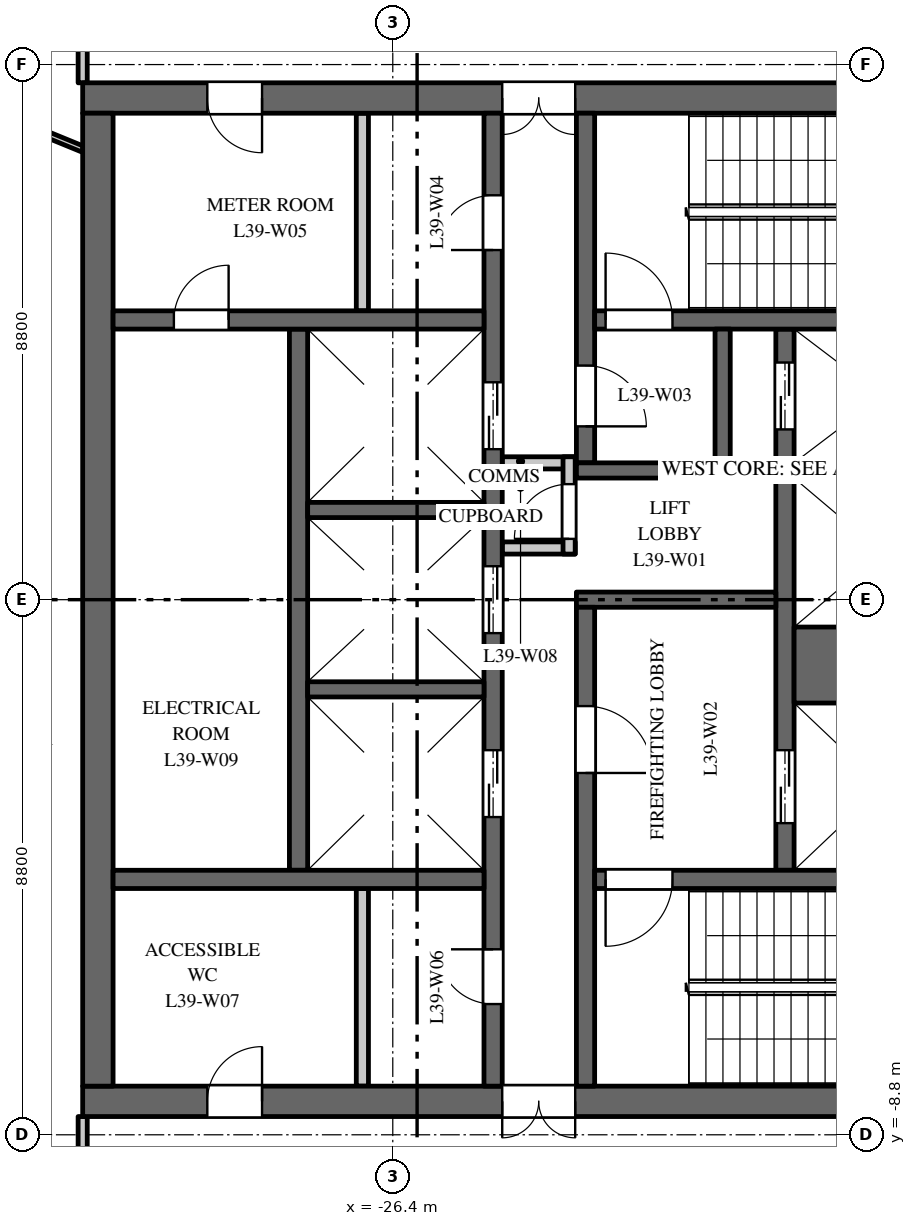
"""IFC4 building model, lengths in metres.
Left out: names, types, materials, properties, quantities, classifications, styles, units other than length and angle.
Written with IfcOpenShell. Run it as: python <this file> out.ifc"""

import sys

from ifc_helpers import new_model, si_unit, direction, frame, frame_2d, origin, place, context, subcontext, project, spatial, rectangle, extrude, element, fill, save


model = new_model("IFC4")
c1 = context("Model", 3, precision=1e-05, world=origin(), true_north=direction((0.0, 1.0)))
c2 = subcontext(c1, "Body", "Model", "MODEL_VIEW")
j1 = project(units=[si_unit("LENGTHUNIT", "METRE"), si_unit("PLANEANGLEUNIT", "RADIAN")], contexts=[c1])
p1 = place(None, origin())
s1 = spatial("IfcSite", under=j1, at=p1, CompositionType="ELEMENT")
p2 = place(p1, origin())
s2 = spatial("IfcBuilding", under=s1, at=p2, CompositionType="ELEMENT")
p3 = place(p2, frame((0.0, 0.0, 170.0)))
s3 = spatial("IfcBuildingStorey", under=s2, at=p3, CompositionType="ELEMENT", Elevation=170.0)
p4 = place(p3, frame((-16.5, 8.25, 0.0), z_axis=(0.0, 0.0, 1.0), x_axis=(-1.0, 0.0, 0.0)))
e1 = element("IfcWall", 1, at=p4, inside=s3, PredefinedType="SHEAR", context=c2, shape_type="SweptSolid", body=[
    extrude(rectangle(XDim=15.0, YDim=0.5, at=frame_2d((7.5, 0.0))), origin(), (0.0, 0.0, 1.0), 3.7),
])
p5 = place(p4, frame((6.9, 0.0, 0.0)))
e2 = element("IfcOpeningElement", 2, at=p5, cuts=e1, PredefinedType="OPENING", context=c2, shape_type="SweptSolid", body=[
    extrude(rectangle(XDim=1.2, YDim=2.1, at=frame_2d((0.6, 1.05))), frame((0.0, 0.26, 0.0), z_axis=(0.0, -1.0, 0.0), x_axis=(1.0, 0.0, 0.0)), (0.0, 0.0, 1.0), 0.52),
])
p6 = place(p4, frame((12.05, 0.0, 0.0)))
e3 = element("IfcOpeningElement", 3, at=p6, cuts=e1, PredefinedType="OPENING", context=c2, shape_type="SweptSolid", body=[
    extrude(rectangle(XDim=0.9, YDim=2.1, at=frame_2d((0.45, 1.05))), frame((0.0, 0.26, 0.0), z_axis=(0.0, -1.0, 0.0), x_axis=(1.0, 0.0, 0.0)), (0.0, 0.0, 1.0), 0.52),
])
p7 = place(p3, frame((-16.5, -8.25, 0.0), z_axis=(0.0, 0.0, 1.0), x_axis=(-1.0, 0.0, 0.0)))
e4 = element("IfcWall", 4, at=p7, inside=s3, PredefinedType="SHEAR", context=c2, shape_type="SweptSolid", body=[
    extrude(rectangle(XDim=15.0, YDim=0.5, at=frame_2d((7.5, 0.0))), origin(), (0.0, 0.0, 1.0), 3.7),
])
p8 = place(p7, frame((6.9, 0.0, 0.0)))
e5 = element("IfcOpeningElement", 5, at=p8, cuts=e4, PredefinedType="OPENING", context=c2, shape_type="SweptSolid", body=[
    extrude(rectangle(XDim=1.2, YDim=2.1, at=frame_2d((0.6, 1.05))), frame((0.0, 0.26, 0.0), z_axis=(0.0, -1.0, 0.0), x_axis=(1.0, 0.0, 0.0)), (0.0, 0.0, 1.0), 0.52),
])
p9 = place(p7, frame((12.05, 0.0, 0.0)))
e6 = element("IfcOpeningElement", 6, at=p9, cuts=e4, PredefinedType="OPENING", context=c2, shape_type="SweptSolid", body=[
    extrude(rectangle(XDim=0.9, YDim=2.1, at=frame_2d((0.45, 1.05))), frame((0.0, 0.26, 0.0), z_axis=(0.0, -1.0, 0.0), x_axis=(1.0, 0.0, 0.0)), (0.0, 0.0, 1.0), 0.52),
])
p10 = place(p3, frame((-27.95, -4.45, 0.0), z_axis=(0.0, 0.0, 1.0), x_axis=(0.0, 1.0, 0.0)))
e7 = element("IfcWall", 7, at=p10, inside=s3, PredefinedType="SHEAR", context=c2, shape_type="SweptSolid", body=[
    extrude(rectangle(XDim=8.9, YDim=0.3, at=frame_2d((4.45, 0.0))), origin(), (0.0, 0.0, 1.0), 3.7),
])
p11 = place(p3, frame((-19.95, -4.45, 0.0), z_axis=(0.0, 0.0, 1.0), x_axis=(0.0, 1.0, 0.0)))
e8 = element("IfcWall", 8, at=p11, inside=s3, PredefinedType="SHEAR", context=c2, shape_type="SweptSolid", body=[
    extrude(rectangle(XDim=8.9, YDim=0.3, at=frame_2d((4.45, 0.0))), origin(), (0.0, 0.0, 1.0), 3.7),
])
p12 = place(p11, frame((0.775, 0.0, 0.0)))
e9 = element("IfcOpeningElement", 9, at=p12, cuts=e8, PredefinedType="OPENING", context=c2, shape_type="SweptSolid", body=[
    extrude(rectangle(XDim=1.2, YDim=2.1, at=frame_2d((0.6, 1.05))), frame((0.0, 0.16, 0.0), z_axis=(0.0, -1.0, 0.0), x_axis=(1.0, 0.0, 0.0)), (0.0, 0.0, 1.0), 0.32),
])
p13 = place(p11, frame((7.25, 0.0, 0.0)))
e10 = element("IfcOpeningElement", 10, at=p13, cuts=e8, PredefinedType="OPENING", context=c2, shape_type="SweptSolid", body=[
    extrude(rectangle(XDim=1.1, YDim=2.1, at=frame_2d((0.55, 1.05))), frame((0.0, 0.16, 0.0), z_axis=(0.0, -1.0, 0.0), x_axis=(1.0, 0.0, 0.0)), (0.0, 0.0, 1.0), 0.32),
])
p14 = place(p3, frame((-24.75, -8.0, 0.0), z_axis=(0.0, 0.0, 1.0), x_axis=(0.0, 1.0, 0.0)))
e11 = element("IfcWall", 11, at=p14, inside=s3, PredefinedType="SHEAR", context=c2, shape_type="SweptSolid", body=[
    extrude(rectangle(XDim=16.0, YDim=0.3, at=frame_2d((8.0, 0.0))), origin(), (0.0, 0.0, 1.0), 3.7),
])
p15 = place(p14, frame((4.425, 0.0, 0.0)))
e12 = element("IfcOpeningElement", 12, at=p15, cuts=e11, PredefinedType="OPENING", context=c2, shape_type="SweptSolid", body=[
    extrude(rectangle(XDim=1.1, YDim=2.1, at=frame_2d((0.55, 1.05))), frame((0.0, 0.16, 0.0), z_axis=(0.0, -1.0, 0.0), x_axis=(1.0, 0.0, 0.0)), (0.0, 0.0, 1.0), 0.32),
])
p16 = place(p14, frame((7.45, 0.0, 0.0)))
e13 = element("IfcOpeningElement", 13, at=p16, cuts=e11, PredefinedType="OPENING", context=c2, shape_type="SweptSolid", body=[
    extrude(rectangle(XDim=1.1, YDim=2.1, at=frame_2d((0.55, 1.05))), frame((0.0, 0.16, 0.0), z_axis=(0.0, -1.0, 0.0), x_axis=(1.0, 0.0, 0.0)), (0.0, 0.0, 1.0), 0.32),
])
p17 = place(p14, frame((10.475, 0.0, 0.0)))
e14 = element("IfcOpeningElement", 14, at=p17, cuts=e11, PredefinedType="OPENING", context=c2, shape_type="SweptSolid", body=[
    extrude(rectangle(XDim=1.1, YDim=2.1, at=frame_2d((0.55, 1.05))), frame((0.0, 0.16, 0.0), z_axis=(0.0, -1.0, 0.0), x_axis=(1.0, 0.0, 0.0)), (0.0, 0.0, 1.0), 0.32),
])
p18 = place(p14, frame((13.75, 0.0, 0.0)))
e15 = element("IfcOpeningElement", 15, at=p18, cuts=e11, PredefinedType="OPENING", context=c2, shape_type="SweptSolid", body=[
    extrude(rectangle(XDim=0.9, YDim=2.1, at=frame_2d((0.45, 1.05))), frame((0.0, 0.16, 0.0), z_axis=(0.0, -1.0, 0.0), x_axis=(1.0, 0.0, 0.0)), (0.0, 0.0, 1.0), 0.32),
])
p19 = place(p14, frame((1.35, 0.0, 0.0)))
e16 = element("IfcOpeningElement", 16, at=p19, cuts=e11, PredefinedType="OPENING", context=c2, shape_type="SweptSolid", body=[
    extrude(rectangle(XDim=0.9, YDim=2.1, at=frame_2d((0.45, 1.05))), frame((0.0, 0.16, 0.0), z_axis=(0.0, -1.0, 0.0), x_axis=(1.0, 0.0, 0.0)), (0.0, 0.0, 1.0), 0.32),
])
p20 = place(p3, frame((-20.1, 0.0, 0.0), z_axis=(0.0, 0.0, 1.0), x_axis=(-1.0, 0.0, 0.0)))
e17 = element("IfcWall", 17, at=p20, inside=s3, PredefinedType="SHEAR", context=c2, shape_type="SweptSolid", body=[
    extrude(rectangle(XDim=3.28, YDim=0.25, at=frame_2d((1.64, 0.0))), origin(), (0.0, 0.0, 1.0), 3.7),
])
for number, where, z_axis, x_axis in (
    (18, (-23.4, 0.85, 0.0), (0.0, 0.0, 1.0), (-1.0, 0.0, 0.0)),
    (19, (-23.4, 2.25, 0.0), (0.0, 0.0, 1.0), (-1.0, 0.0, 0.0)),
):
    element("IfcWall", number, at=place(p3, frame(where, z_axis=z_axis, x_axis=x_axis)), inside=s3, PredefinedType="PARTITIONING", context=c2, shape_type="SweptSolid", body=[
        extrude(rectangle(XDim=1.2, YDim=0.2, at=frame_2d((0.6, 0.0))), origin(), (0.0, 0.0, 1.0), 3.7),
    ])
p21 = place(p3, frame((-23.5, 0.75, 0.0), z_axis=(0.0, 0.0, 1.0), x_axis=(0.0, 1.0, 0.0)))
e20 = element("IfcWall", 20, at=p21, inside=s3, PredefinedType="PARTITIONING", context=c2, shape_type="SweptSolid", body=[
    extrude(rectangle(XDim=1.6, YDim=0.2, at=frame_2d((0.8, 0.0))), origin(), (0.0, 0.0, 1.0), 3.7),
])
p22 = place(p21, frame((0.25, 0.0, 0.0)))
e21 = element("IfcOpeningElement", 21, at=p22, cuts=e20, PredefinedType="OPENING", context=c2, shape_type="SweptSolid", body=[
    extrude(rectangle(XDim=0.9, YDim=2.1, at=frame_2d((0.45, 1.05))), frame((0.0, 0.11, 0.0), z_axis=(0.0, -1.0, 0.0), x_axis=(1.0, 0.0, 0.0)), (0.0, 0.0, 1.0), 0.22),
])
p23 = place(p3, frame((-31.25, -8.0, 0.0), z_axis=(0.0, 0.0, 1.0), x_axis=(0.0, 1.0, 0.0)))
e22 = element("IfcWall", 22, at=p23, inside=s3, PredefinedType="SHEAR", context=c2, shape_type="SweptSolid", body=[
    extrude(rectangle(XDim=16.0, YDim=0.5, at=frame_2d((8.0, 0.0))), origin(), (0.0, 0.0, 1.0), 3.7),
])
p24 = place(p3, frame((-24.9, 4.6, 0.0), z_axis=(0.0, 0.0, 1.0), x_axis=(-1.0, 0.0, 0.0)))
e23 = element("IfcWall", 23, at=p24, inside=s3, PredefinedType="SHEAR", context=c2, shape_type="SweptSolid", body=[
    extrude(rectangle(XDim=6.1, YDim=0.3, at=frame_2d((3.05, 0.0))), origin(), (0.0, 0.0, 1.0), 3.7),
])
p25 = place(p24, frame((4.2, 0.0, 0.0)))
e24 = element("IfcOpeningElement", 24, at=p25, cuts=e23, PredefinedType="OPENING", context=c2, shape_type="SweptSolid", body=[
    extrude(rectangle(XDim=0.9, YDim=2.1, at=frame_2d((0.45, 1.05))), frame((0.0, 0.16, 0.0), z_axis=(0.0, -1.0, 0.0), x_axis=(1.0, 0.0, 0.0)), (0.0, 0.0, 1.0), 0.32),
])
for number, where, z_axis, x_axis in (
    (25, (-26.9, 4.75, 0.0), (0.0, 0.0, 1.0), (0.0, 1.0, 0.0)),
    (26, (-26.9, -8.0, 0.0), (0.0, 0.0, 1.0), (0.0, 1.0, 0.0)),
):
    element("IfcWall", number, at=place(p3, frame(where, z_axis=z_axis, x_axis=x_axis)), inside=s3, PredefinedType="PARTITIONING", context=c2, shape_type="SweptSolid", body=[
        extrude(rectangle(XDim=3.25, YDim=0.2, at=frame_2d((1.625, 0.0))), origin(), (0.0, 0.0, 1.0), 3.7),
    ])
p26 = place(p3, frame((-24.9, -4.6, 0.0), z_axis=(0.0, 0.0, 1.0), x_axis=(-1.0, 0.0, 0.0)))
e27 = element("IfcWall", 27, at=p26, inside=s3, PredefinedType="SHEAR", context=c2, shape_type="SweptSolid", body=[
    extrude(rectangle(XDim=6.1, YDim=0.3, at=frame_2d((3.05, 0.0))), origin(), (0.0, 0.0, 1.0), 3.7),
])
p27 = place(p3, frame((-16.9, -1.075, 0.0), z_axis=(0.0, 0.0, 1.0), x_axis=(-1.0, 0.0, 0.0)))
e28 = element("IfcWall", 28, at=p27, inside=s3, PredefinedType="SHEAR", context=c2, shape_type="SweptSolid", body=[
    extrude(rectangle(XDim=2.9, YDim=1.25, at=frame_2d((1.45, 0.0))), origin(), (0.0, 0.0, 1.0), 3.7),
])
for number, where, z_axis, x_axis in (
    (29, (-16.9, 2.125, 0.0), (0.0, 0.0, 1.0), (-1.0, 0.0, 0.0)),
    (30, (-24.9, -1.475, 0.0), (0.0, 0.0, 1.0), (-1.0, 0.0, 0.0)),
    (31, (-24.9, 1.475, 0.0), (0.0, 0.0, 1.0), (-1.0, 0.0, 0.0)),
):
    element("IfcWall", number, at=place(p3, frame(where, z_axis=z_axis, x_axis=x_axis)), inside=s3, PredefinedType="SHEAR", context=c2, shape_type="SweptSolid", body=[
        extrude(rectangle(XDim=2.9, YDim=0.25, at=frame_2d((1.45, 0.0))), origin(), (0.0, 0.0, 1.0), 3.7),
    ])
p28 = place(p3, frame((-23.23, 2.25, 0.0), z_axis=(0.0, 0.0, 1.0), x_axis=(0.0, 1.0, 0.0)))
e32 = element("IfcWall", 32, at=p28, inside=s3, PredefinedType="SHEAR", context=c2, shape_type="SweptSolid", body=[
    extrude(rectangle(XDim=5.75, YDim=0.3, at=frame_2d((2.875, 0.0))), origin(), (0.0, 0.0, 1.0), 3.7),
])
p29 = place(p28, frame((0.6, 0.0, 0.0)))
e33 = element("IfcOpeningElement", 33, at=p29, cuts=e32, PredefinedType="OPENING", context=c2, shape_type="SweptSolid", body=[
    extrude(rectangle(XDim=1.0, YDim=2.1, at=frame_2d((0.5, 1.05))), frame((0.0, 0.16, 0.0), z_axis=(0.0, -1.0, 0.0), x_axis=(1.0, 0.0, 0.0)), (0.0, 0.0, 1.0), 0.32),
])
p30 = place(p3, frame((-23.23, -8.0, 0.0), z_axis=(0.0, 0.0, 1.0), x_axis=(0.0, 1.0, 0.0)))
e34 = element("IfcWall", 34, at=p30, inside=s3, PredefinedType="SHEAR", context=c2, shape_type="SweptSolid", body=[
    extrude(rectangle(XDim=7.875, YDim=0.3, at=frame_2d((3.938, 0.0))), origin(), (0.0, 0.0, 1.0), 3.7),
])
p31 = place(p30, frame((5.15, 0.0, 0.0)))
e35 = element("IfcOpeningElement", 35, at=p31, cuts=e34, PredefinedType="OPENING", context=c2, shape_type="SweptSolid", body=[
    extrude(rectangle(XDim=1.1, YDim=2.1, at=frame_2d((0.55, 1.05))), frame((0.0, 0.16, 0.0), z_axis=(0.0, -1.0, 0.0), x_axis=(1.0, 0.0, 0.0)), (0.0, 0.0, 1.0), 0.32),
])
p32 = place(p3, frame((-16.9, 4.6, 0.0), z_axis=(0.0, 0.0, 1.0), x_axis=(-1.0, 0.0, 0.0)))
e36 = element("IfcWall", 36, at=p32, inside=s3, PredefinedType="SHEAR", context=c2, shape_type="SweptSolid", body=[
    extrude(rectangle(XDim=6.18, YDim=0.3, at=frame_2d((3.09, 0.0))), origin(), (0.0, 0.0, 1.0), 3.7),
])
p33 = place(p32, frame((4.9, 0.0, 0.0)))
e37 = element("IfcOpeningElement", 37, at=p33, cuts=e36, PredefinedType="OPENING", context=c2, shape_type="SweptSolid", body=[
    extrude(rectangle(XDim=1.1, YDim=2.1, at=frame_2d((0.55, 1.05))), frame((0.0, 0.16, 0.0), z_axis=(0.0, -1.0, 0.0), x_axis=(1.0, 0.0, 0.0)), (0.0, 0.0, 1.0), 0.32),
])
p34 = place(p3, frame((-16.9, -4.6, 0.0), z_axis=(0.0, 0.0, 1.0), x_axis=(-1.0, 0.0, 0.0)))
e38 = element("IfcWall", 38, at=p34, inside=s3, PredefinedType="SHEAR", context=c2, shape_type="SweptSolid", body=[
    extrude(rectangle(XDim=6.18, YDim=0.3, at=frame_2d((3.09, 0.0))), origin(), (0.0, 0.0, 1.0), 3.7),
])
p35 = place(p34, frame((4.9, 0.0, 0.0)))
e39 = element("IfcOpeningElement", 39, at=p35, cuts=e38, PredefinedType="OPENING", context=c2, shape_type="SweptSolid", body=[
    extrude(rectangle(XDim=1.1, YDim=2.1, at=frame_2d((0.55, 1.05))), frame((0.0, 0.16, 0.0), z_axis=(0.0, -1.0, 0.0), x_axis=(1.0, 0.0, 0.0)), (0.0, 0.0, 1.0), 0.32),
])
p36 = place(p3, frame((-20.85, 2.125, 0.0), z_axis=(0.0, 0.0, 1.0), x_axis=(-1.0, 0.0, 0.0)))
e40 = element("IfcWall", 40, at=p36, inside=s3, PredefinedType="SHEAR", context=c2, shape_type="SweptSolid", body=[
    extrude(rectangle(XDim=2.53, YDim=0.25, at=frame_2d((1.265, 0.0))), origin(), (0.0, 0.0, 1.0), 3.7),
])
p37 = place(p3, frame((-20.975, 2.25, 0.0), z_axis=(0.0, 0.0, 1.0), x_axis=(0.0, 1.0, 0.0)))
e41 = element("IfcWall", 41, at=p37, inside=s3, PredefinedType="SHEAR", context=c2, shape_type="SweptSolid", body=[
    extrude(rectangle(XDim=2.2, YDim=0.25, at=frame_2d((1.1, 0.0))), origin(), (0.0, 0.0, 1.0), 3.7),
])
p38 = place(p3, frame((-34.234, 8.53, 0.0), z_axis=(0.0, 0.0, 1.0), x_axis=(0.925344112436, -0.379128307542, 0.0)))
e42 = element("IfcWall", 42, at=p38, inside=s3, PredefinedType="PARTITIONING", context=c2, shape_type="SweptSolid", body=[
    extrude(rectangle(XDim=2.954, YDim=0.1, at=frame_2d((1.477, 0.0))), origin(), (0.0, 0.0, 1.0), 2.9),
])
for number, where, z_axis, x_axis in (
    (43, (-31.5, -10.7, 0.0), (0.0, 0.0, 1.0), (0.0, 1.0, 0.0)),
    (44, (-31.5, 8.5, 0.0), (0.0, 0.0, 1.0), (0.0, 1.0, 0.0)),
):
    element("IfcWall", number, at=place(p3, frame(where, z_axis=z_axis, x_axis=x_axis)), inside=s3, PredefinedType="PARTITIONING", context=c2, shape_type="SweptSolid", body=[
        extrude(rectangle(XDim=2.2, YDim=0.15, at=frame_2d((1.1, 0.0))), origin(), (0.0, 0.0, 1.0), 3.7),
    ])
p39 = place(p12, origin())
e45 = element("IfcDoor", 45, at=p39, inside=s3, OperationType="DOUBLE_DOOR_SLIDING", PredefinedType="DOOR", context=c2, shape_type="SweptSolid", body=[
    extrude(rectangle(XDim=1.2, YDim=2.1, at=frame_2d((0.6, 1.05))), frame((0.0, 0.025, 0.0), z_axis=(0.0, -1.0, 0.0), x_axis=(1.0, 0.0, 0.0)), (0.0, 0.0, 1.0), 0.05),
])
fill(e9, e45)
p40 = place(p13, origin())
e46 = element("IfcDoor", 46, at=p40, inside=s3, OperationType="DOUBLE_DOOR_SLIDING", PredefinedType="DOOR", context=c2, shape_type="SweptSolid", body=[
    extrude(rectangle(XDim=1.1, YDim=2.1, at=frame_2d((0.55, 1.05))), frame((0.0, 0.025, 0.0), z_axis=(0.0, -1.0, 0.0), x_axis=(1.0, 0.0, 0.0)), (0.0, 0.0, 1.0), 0.05),
])
fill(e10, e46)
p41 = place(p15, origin())
e47 = element("IfcDoor", 47, at=p41, inside=s3, OperationType="DOUBLE_DOOR_SLIDING", PredefinedType="DOOR", context=c2, shape_type="SweptSolid", body=[
    extrude(rectangle(XDim=1.1, YDim=2.1, at=frame_2d((0.55, 1.05))), frame((0.0, 0.025, 0.0), z_axis=(0.0, -1.0, 0.0), x_axis=(1.0, 0.0, 0.0)), (0.0, 0.0, 1.0), 0.05),
])
fill(e12, e47)
p42 = place(p16, origin())
e48 = element("IfcDoor", 48, at=p42, inside=s3, OperationType="DOUBLE_DOOR_SLIDING", PredefinedType="DOOR", context=c2, shape_type="SweptSolid", body=[
    extrude(rectangle(XDim=1.1, YDim=2.1, at=frame_2d((0.55, 1.05))), frame((0.0, 0.025, 0.0), z_axis=(0.0, -1.0, 0.0), x_axis=(1.0, 0.0, 0.0)), (0.0, 0.0, 1.0), 0.05),
])
fill(e13, e48)
p43 = place(p17, origin())
e49 = element("IfcDoor", 49, at=p43, inside=s3, OperationType="DOUBLE_DOOR_SLIDING", PredefinedType="DOOR", context=c2, shape_type="SweptSolid", body=[
    extrude(rectangle(XDim=1.1, YDim=2.1, at=frame_2d((0.55, 1.05))), frame((0.0, 0.025, 0.0), z_axis=(0.0, -1.0, 0.0), x_axis=(1.0, 0.0, 0.0)), (0.0, 0.0, 1.0), 0.05),
])
fill(e14, e49)
p44 = place(p33, origin())
e50 = element("IfcDoor", 50, at=p44, inside=s3, OperationType="SINGLE_SWING_RIGHT", PredefinedType="DOOR", context=c2, shape_type="SweptSolid", body=[
    extrude(rectangle(XDim=1.1, YDim=2.1, at=frame_2d((0.55, 1.05))), frame((0.0, 0.025, 0.0), z_axis=(0.0, -1.0, 0.0), x_axis=(1.0, 0.0, 0.0)), (0.0, 0.0, 1.0), 0.05),
])
fill(e37, e50)
p45 = place(p35, origin())
e51 = element("IfcDoor", 51, at=p45, inside=s3, OperationType="SINGLE_SWING_LEFT", PredefinedType="DOOR", context=c2, shape_type="SweptSolid", body=[
    extrude(rectangle(XDim=1.1, YDim=2.1, at=frame_2d((0.55, 1.05))), frame((0.0, 0.025, 0.0), z_axis=(0.0, -1.0, 0.0), x_axis=(1.0, 0.0, 0.0)), (0.0, 0.0, 1.0), 0.05),
])
fill(e39, e51)
p46 = place(p31, origin())
e52 = element("IfcDoor", 52, at=p46, inside=s3, OperationType="SINGLE_SWING_LEFT", PredefinedType="DOOR", context=c2, shape_type="SweptSolid", body=[
    extrude(rectangle(XDim=1.1, YDim=2.1, at=frame_2d((0.55, 1.05))), frame((0.0, 0.025, 0.0), z_axis=(0.0, -1.0, 0.0), x_axis=(1.0, 0.0, 0.0)), (0.0, 0.0, 1.0), 0.05),
])
fill(e35, e52)
p47 = place(p29, origin())
e53 = element("IfcDoor", 53, at=p47, inside=s3, OperationType="SINGLE_SWING_LEFT", PredefinedType="DOOR", context=c2, shape_type="SweptSolid", body=[
    extrude(rectangle(XDim=1.0, YDim=2.1, at=frame_2d((0.5, 1.05))), frame((0.0, 0.025, 0.0), z_axis=(0.0, -1.0, 0.0), x_axis=(1.0, 0.0, 0.0)), (0.0, 0.0, 1.0), 0.05),
])
fill(e33, e53)
p48 = place(p5, origin())
e54 = element("IfcDoor", 54, at=p48, inside=s3, OperationType="DOUBLE_DOOR_DOUBLE_SWING", PredefinedType="DOOR", context=c2, shape_type="SweptSolid", body=[
    extrude(rectangle(XDim=1.2, YDim=2.1, at=frame_2d((0.6, 1.05))), frame((0.0, 0.025, 0.0), z_axis=(0.0, -1.0, 0.0), x_axis=(1.0, 0.0, 0.0)), (0.0, 0.0, 1.0), 0.05),
])
fill(e2, e54)
p49 = place(p8, origin())
e55 = element("IfcDoor", 55, at=p49, inside=s3, OperationType="DOUBLE_DOOR_DOUBLE_SWING", PredefinedType="DOOR", context=c2, shape_type="SweptSolid", body=[
    extrude(rectangle(XDim=1.2, YDim=2.1, at=frame_2d((0.6, 1.05))), frame((0.0, 0.025, 0.0), z_axis=(0.0, -1.0, 0.0), x_axis=(1.0, 0.0, 0.0)), (0.0, 0.0, 1.0), 0.05),
])
fill(e5, e55)
p50 = place(p18, origin())
e56 = element("IfcDoor", 56, at=p50, inside=s3, OperationType="SINGLE_SWING_RIGHT", PredefinedType="DOOR", context=c2, shape_type="SweptSolid", body=[
    extrude(rectangle(XDim=0.9, YDim=2.1, at=frame_2d((0.45, 1.05))), frame((0.0, 0.025, 0.0), z_axis=(0.0, -1.0, 0.0), x_axis=(1.0, 0.0, 0.0)), (0.0, 0.0, 1.0), 0.05),
])
fill(e15, e56)
p51 = place(p6, origin())
e57 = element("IfcDoor", 57, at=p51, inside=s3, OperationType="SINGLE_SWING_RIGHT", PredefinedType="DOOR", context=c2, shape_type="SweptSolid", body=[
    extrude(rectangle(XDim=0.9, YDim=2.1, at=frame_2d((0.45, 1.05))), frame((0.0, 0.025, 0.0), z_axis=(0.0, -1.0, 0.0), x_axis=(1.0, 0.0, 0.0)), (0.0, 0.0, 1.0), 0.05),
])
fill(e3, e57)
p52 = place(p19, origin())
e58 = element("IfcDoor", 58, at=p52, inside=s3, OperationType="SINGLE_SWING_LEFT", PredefinedType="DOOR", context=c2, shape_type="SweptSolid", body=[
    extrude(rectangle(XDim=0.9, YDim=2.1, at=frame_2d((0.45, 1.05))), frame((0.0, 0.025, 0.0), z_axis=(0.0, -1.0, 0.0), x_axis=(1.0, 0.0, 0.0)), (0.0, 0.0, 1.0), 0.05),
])
fill(e16, e58)
p53 = place(p9, origin())
e59 = element("IfcDoor", 59, at=p53, inside=s3, OperationType="SINGLE_SWING_LEFT", PredefinedType="DOOR", context=c2, shape_type="SweptSolid", body=[
    extrude(rectangle(XDim=0.9, YDim=2.1, at=frame_2d((0.45, 1.05))), frame((0.0, 0.025, 0.0), z_axis=(0.0, -1.0, 0.0), x_axis=(1.0, 0.0, 0.0)), (0.0, 0.0, 1.0), 0.05),
])
fill(e6, e59)
p54 = place(p22, origin())
e60 = element("IfcDoor", 60, at=p54, inside=s3, OperationType="SINGLE_SWING_RIGHT", PredefinedType="DOOR", context=c2, shape_type="SweptSolid", body=[
    extrude(rectangle(XDim=0.9, YDim=2.1, at=frame_2d((0.45, 1.05))), frame((0.0, 0.025, 0.0), z_axis=(0.0, -1.0, 0.0), x_axis=(1.0, 0.0, 0.0)), (0.0, 0.0, 1.0), 0.05),
])
fill(e21, e60)
p55 = place(p25, origin())
e61 = element("IfcDoor", 61, at=p55, inside=s3, OperationType="SINGLE_SWING_LEFT", PredefinedType="DOOR", context=c2, shape_type="SweptSolid", body=[
    extrude(rectangle(XDim=0.9, YDim=2.1, at=frame_2d((0.45, 1.05))), frame((0.0, 0.025, 0.0), z_axis=(0.0, -1.0, 0.0), x_axis=(1.0, 0.0, 0.0)), (0.0, 0.0, 1.0), 0.05),
])
fill(e24, e61)
save(model, sys.argv[1])
